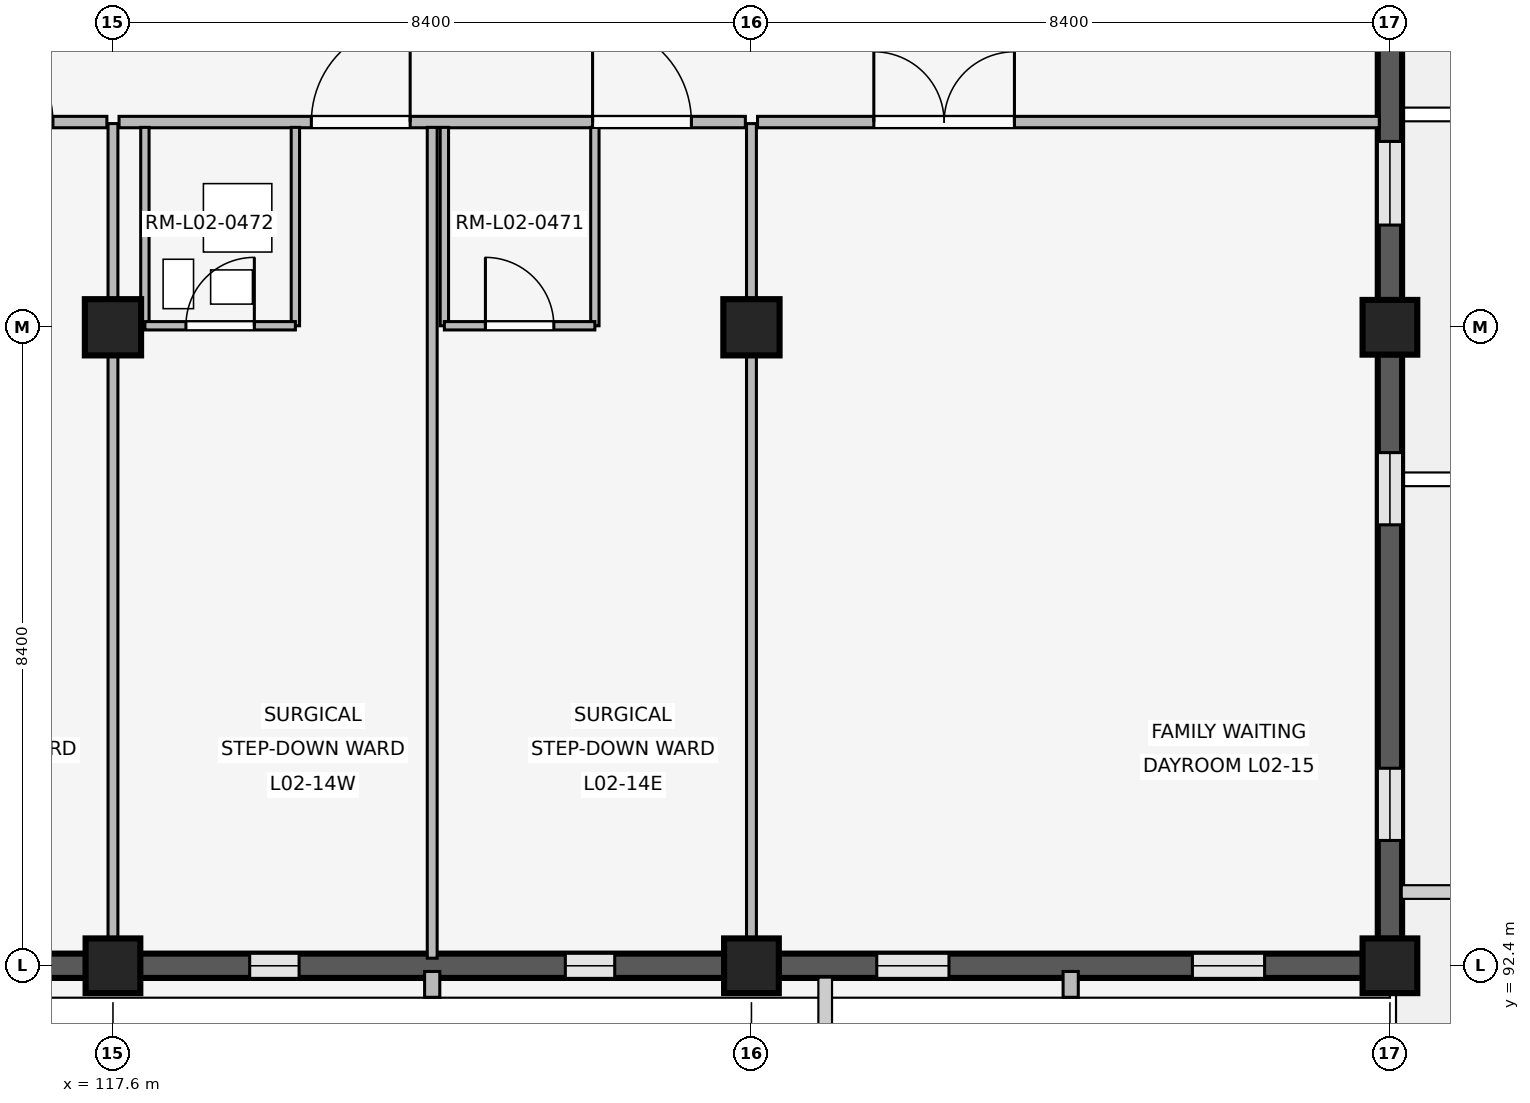
"""IFC4 building model, lengths in metres.
Left out: names, types, materials, properties, quantities, classifications, styles, units other than length and angle.
Written with IfcOpenShell. Run it as: python <this file> out.ifc"""

import sys

from ifc_helpers import new_model, si_unit, direction, frame, frame_2d, origin, origin_2d, place, context, subcontext, project, spatial, rectangle, extrude, element, fill, save


model = new_model("IFC4")
c1 = context("Model", 3, precision=1e-05, world=origin(), true_north=direction((0.0, 1.0)))
c2 = subcontext(c1, "Body", "Model", "MODEL_VIEW")
j1 = project(units=[si_unit("LENGTHUNIT", "METRE"), si_unit("PLANEANGLEUNIT", "RADIAN")], contexts=[c1])
p1 = place(None, origin())
s1 = spatial("IfcSite", under=j1, at=p1, CompositionType="ELEMENT")
p2 = place(p1, origin())
s2 = spatial("IfcBuilding", under=s1, at=p2, CompositionType="ELEMENT")
p3 = place(p2, frame((0.0, 0.0, 8.1)))
s3 = spatial("IfcBuildingStorey", under=s2, at=p3, CompositionType="ELEMENT", Elevation=8.1)
p4 = place(p3, frame((117.6, 92.4, 0.0), z_axis=(0.0, 0.0, 1.0), x_axis=(1.0, 0.0, 0.0)))
e1 = element("IfcColumn", 1, at=p4, inside=s3, PredefinedType="COLUMN", context=c2, shape_type="SweptSolid", body=[
    extrude(rectangle(XDim=0.72, YDim=0.72, at=origin_2d()), origin(), (0.0, 0.0, 1.0), 4.8),
])
p5 = place(p3, frame((117.6, 100.8, 0.0), z_axis=(0.0, 0.0, 1.0), x_axis=(1.0, 0.0, 0.0)))
e2 = element("IfcColumn", 2, at=p5, inside=s3, PredefinedType="COLUMN", context=c2, shape_type="SweptSolid", body=[
    extrude(rectangle(XDim=0.74, YDim=0.74, at=origin_2d()), origin(), (0.0, 0.0, 1.0), 4.8),
])
p6 = place(p3, frame((126.0, 92.4, 0.0), z_axis=(0.0, 0.0, 1.0), x_axis=(1.0, 0.0, 0.0)))
e3 = element("IfcColumn", 3, at=p6, inside=s3, PredefinedType="COLUMN", context=c2, shape_type="SweptSolid", body=[
    extrude(rectangle(XDim=0.72, YDim=0.72, at=origin_2d()), origin(), (0.0, 0.0, 1.0), 4.8),
])
p7 = place(p3, frame((126.0, 100.8, 0.0), z_axis=(0.0, 0.0, 1.0), x_axis=(1.0, 0.0, 0.0)))
e4 = element("IfcColumn", 4, at=p7, inside=s3, PredefinedType="COLUMN", context=c2, shape_type="SweptSolid", body=[
    extrude(rectangle(XDim=0.74, YDim=0.74, at=origin_2d()), origin(), (0.0, 0.0, 1.0), 4.8),
])
for number, where, z_axis, x_axis in (
    (5, (134.4, 92.4, 0.0), (0.0, 0.0, 1.0), (1.0, 0.0, 0.0)),
    (6, (134.4, 100.8, 0.0), (0.0, 0.0, 1.0), (1.0, 0.0, 0.0)),
):
    element("IfcColumn", number, at=place(p3, frame(where, z_axis=z_axis, x_axis=x_axis)), inside=s3, PredefinedType="COLUMN", context=c2, shape_type="SweptSolid", body=[
        extrude(rectangle(XDim=0.72, YDim=0.72, at=origin_2d()), origin(), (0.0, 0.0, 1.0), 4.8),
    ])
p8 = place(p3, frame((117.245, 92.4, 0.0), z_axis=(0.0, 0.0, 1.0), x_axis=(-1.0, 0.0, 0.0)))
e7 = element("IfcWall", 7, at=p8, inside=s3, PredefinedType="SOLIDWALL", context=c2, shape_type="SweptSolid", body=[
    extrude(rectangle(XDim=7.69, YDim=0.32, at=frame_2d((3.845, 0.0))), origin(), (0.0, 0.0, 1.0), 3.86),
])
p9 = place(p8, frame((1.394, 0.0, 0.85)))
e8 = element("IfcOpeningElement", 8, at=p9, cuts=e7, PredefinedType="OPENING", context=c2, shape_type="SweptSolid", body=[
    extrude(rectangle(XDim=0.75, YDim=1.85, at=frame_2d((0.375, 0.925))), frame((0.0, 0.17, 0.0), z_axis=(0.0, -1.0, 0.0), x_axis=(1.0, 0.0, 0.0)), (0.0, 0.0, 1.0), 0.34),
])
p10 = place(p8, frame((5.546, 0.0, 0.85)))
e9 = element("IfcOpeningElement", 9, at=p10, cuts=e7, PredefinedType="OPENING", context=c2, shape_type="SweptSolid", body=[
    extrude(rectangle(XDim=0.75, YDim=1.85, at=frame_2d((0.375, 0.925))), frame((0.0, 0.17, 0.0), z_axis=(0.0, -1.0, 0.0), x_axis=(1.0, 0.0, 0.0)), (0.0, 0.0, 1.0), 0.34),
])
p11 = place(p3, frame((125.645, 92.4, 0.0), z_axis=(0.0, 0.0, 1.0), x_axis=(-1.0, 0.0, 0.0)))
e10 = element("IfcWall", 10, at=p11, inside=s3, PredefinedType="SOLIDWALL", context=c2, shape_type="SweptSolid", body=[
    extrude(rectangle(XDim=7.69, YDim=0.32, at=frame_2d((3.845, 0.0))), origin(), (0.0, 0.0, 1.0), 3.86),
])
p12 = place(p11, frame((1.444, 0.0, 0.85)))
e11 = element("IfcOpeningElement", 11, at=p12, cuts=e10, PredefinedType="OPENING", context=c2, shape_type="SweptSolid", body=[
    extrude(rectangle(XDim=0.65, YDim=1.75, at=frame_2d((0.325, 0.875))), frame((0.0, 0.17, 0.0), z_axis=(0.0, -1.0, 0.0), x_axis=(1.0, 0.0, 0.0)), (0.0, 0.0, 1.0), 0.34),
])
p13 = place(p11, frame((5.596, 0.0, 0.85)))
e12 = element("IfcOpeningElement", 12, at=p13, cuts=e10, PredefinedType="OPENING", context=c2, shape_type="SweptSolid", body=[
    extrude(rectangle(XDim=0.65, YDim=1.75, at=frame_2d((0.325, 0.875))), frame((0.0, 0.17, 0.0), z_axis=(0.0, -1.0, 0.0), x_axis=(1.0, 0.0, 0.0)), (0.0, 0.0, 1.0), 0.34),
])
p14 = place(p3, frame((121.8, 92.325, 0.0), z_axis=(0.0, 0.0, 1.0), x_axis=(0.0, -1.0, 0.0)))
e13 = element("IfcWall", 13, at=p14, inside=s3, PredefinedType="ELEMENTEDWALL", context=c2, shape_type="SweptSolid", body=[
    extrude(rectangle(XDim=0.34, YDim=0.2, at=frame_2d((0.17, 0.0))), origin(), (0.0, 0.0, 1.0), 3.84),
])
p15 = place(p3, frame((134.045, 92.4, 0.0), z_axis=(0.0, 0.0, 1.0), x_axis=(-1.0, 0.0, 0.0)))
e14 = element("IfcWall", 14, at=p15, inside=s3, PredefinedType="SOLIDWALL", context=c2, shape_type="SweptSolid", body=[
    extrude(rectangle(XDim=7.69, YDim=0.32, at=frame_2d((3.845, 0.0))), origin(), (0.0, 0.0, 1.0), 3.86),
])
p16 = place(p15, frame((1.294, 0.0, 0.85)))
e15 = element("IfcOpeningElement", 15, at=p16, cuts=e14, PredefinedType="OPENING", context=c2, shape_type="SweptSolid", body=[
    extrude(rectangle(XDim=0.95, YDim=1.6, at=frame_2d((0.475, 0.8))), frame((0.0, 0.17, 0.0), z_axis=(0.0, -1.0, 0.0), x_axis=(1.0, 0.0, 0.0)), (0.0, 0.0, 1.0), 0.34),
])
p17 = place(p15, frame((5.446, 0.0, 0.85)))
e16 = element("IfcOpeningElement", 16, at=p17, cuts=e14, PredefinedType="OPENING", context=c2, shape_type="SweptSolid", body=[
    extrude(rectangle(XDim=0.95, YDim=1.6, at=frame_2d((0.475, 0.8))), frame((0.0, 0.17, 0.0), z_axis=(0.0, -1.0, 0.0), x_axis=(1.0, 0.0, 0.0)), (0.0, 0.0, 1.0), 0.34),
])
p18 = place(p3, frame((130.2, 92.325, 0.0), z_axis=(0.0, 0.0, 1.0), x_axis=(0.0, -1.0, 0.0)))
e17 = element("IfcWall", 17, at=p18, inside=s3, PredefinedType="ELEMENTEDWALL", context=c2, shape_type="SweptSolid", body=[
    extrude(rectangle(XDim=0.34, YDim=0.2, at=frame_2d((0.17, 0.0))), origin(), (0.0, 0.0, 1.0), 3.84),
])
p19 = place(p3, frame((134.4, 100.445, 0.0), z_axis=(0.0, 0.0, 1.0), x_axis=(0.0, -1.0, 0.0)))
e18 = element("IfcWall", 18, at=p19, inside=s3, PredefinedType="SOLIDWALL", context=c2, shape_type="SweptSolid", body=[
    extrude(rectangle(XDim=7.69, YDim=0.32, at=frame_2d((3.845, 0.0))), origin(), (0.0, 0.0, 1.0), 3.86),
])
p20 = place(p19, frame((1.294, 0.0, 0.85)))
e19 = element("IfcOpeningElement", 19, at=p20, cuts=e18, PredefinedType="OPENING", context=c2, shape_type="SweptSolid", body=[
    extrude(rectangle(XDim=0.95, YDim=1.6, at=frame_2d((0.475, 0.8))), frame((0.0, 0.17, 0.0), z_axis=(0.0, -1.0, 0.0), x_axis=(1.0, 0.0, 0.0)), (0.0, 0.0, 1.0), 0.34),
])
p21 = place(p19, frame((5.446, 0.0, 0.85)))
e20 = element("IfcOpeningElement", 20, at=p21, cuts=e18, PredefinedType="OPENING", context=c2, shape_type="SweptSolid", body=[
    extrude(rectangle(XDim=0.95, YDim=1.6, at=frame_2d((0.475, 0.8))), frame((0.0, 0.17, 0.0), z_axis=(0.0, -1.0, 0.0), x_axis=(1.0, 0.0, 0.0)), (0.0, 0.0, 1.0), 0.34),
])
p22 = place(p3, frame((134.4, 108.845, 0.0), z_axis=(0.0, 0.0, 1.0), x_axis=(0.0, -1.0, 0.0)))
e21 = element("IfcWall", 21, at=p22, inside=s3, PredefinedType="SOLIDWALL", context=c2, shape_type="SweptSolid", body=[
    extrude(rectangle(XDim=7.69, YDim=0.32, at=frame_2d((3.845, 0.0))), origin(), (0.0, 0.0, 1.0), 3.86),
])
p23 = place(p22, frame((0.99, 0.0, 0.85)))
e22 = element("IfcOpeningElement", 22, at=p23, cuts=e21, PredefinedType="OPENING", context=c2, shape_type="SweptSolid", body=[
    extrude(rectangle(XDim=1.1, YDim=1.6, at=frame_2d((0.55, 0.8))), frame((0.0, 0.17, 0.0), z_axis=(0.0, -1.0, 0.0), x_axis=(1.0, 0.0, 0.0)), (0.0, 0.0, 1.0), 0.34),
])
p24 = place(p22, frame((5.6, 0.0, 0.85)))
e23 = element("IfcOpeningElement", 23, at=p24, cuts=e21, PredefinedType="OPENING", context=c2, shape_type="SweptSolid", body=[
    extrude(rectangle(XDim=1.1, YDim=1.6, at=frame_2d((0.55, 0.8))), frame((0.0, 0.17, 0.0), z_axis=(0.0, -1.0, 0.0), x_axis=(1.0, 0.0, 0.0)), (0.0, 0.0, 1.0), 0.34),
])
p25 = place(p3, frame((109.28, 103.5, 0.0), z_axis=(0.0, 0.0, 1.0), x_axis=(1.0, 0.0, 0.0)))
e24 = element("IfcWall", 24, at=p25, inside=s3, PredefinedType="PARTITIONING", context=c2, shape_type="SweptSolid", body=[
    extrude(rectangle(XDim=8.24, YDim=0.15, at=frame_2d((4.12, 0.0))), origin(), (0.0, 0.0, 1.0), 3.84),
])
p26 = place(p25, frame((2.53, 0.0, 0.0)))
e25 = element("IfcOpeningElement", 25, at=p26, cuts=e24, PredefinedType="OPENING", context=c2, shape_type="SweptSolid", body=[
    extrude(rectangle(XDim=1.3, YDim=2.25, at=frame_2d((0.65, 1.125))), frame((0.0, 0.085, 0.0), z_axis=(0.0, -1.0, 0.0), x_axis=(1.0, 0.0, 0.0)), (0.0, 0.0, 1.0), 0.17),
])
p27 = place(p25, frame((6.23, 0.0, 0.0)))
e26 = element("IfcOpeningElement", 26, at=p27, cuts=e24, PredefinedType="OPENING", context=c2, shape_type="SweptSolid", body=[
    extrude(rectangle(XDim=1.3, YDim=2.25, at=frame_2d((0.65, 1.125))), frame((0.0, 0.085, 0.0), z_axis=(0.0, -1.0, 0.0), x_axis=(1.0, 0.0, 0.0)), (0.0, 0.0, 1.0), 0.17),
])
p28 = place(p3, frame((117.6, 92.54, 0.0), z_axis=(0.0, 0.0, 1.0), x_axis=(0.0, 1.0, 0.0)))
e27 = element("IfcWall", 27, at=p28, inside=s3, PredefinedType="PARTITIONING", context=c2, shape_type="SweptSolid", body=[
    extrude(rectangle(XDim=10.94, YDim=0.13, at=frame_2d((5.47, 0.0))), origin(), (0.0, 0.0, 1.0), 3.84),
])
p29 = place(p3, frame((117.68, 103.5, 0.0), z_axis=(0.0, 0.0, 1.0), x_axis=(1.0, 0.0, 0.0)))
e28 = element("IfcWall", 28, at=p29, inside=s3, PredefinedType="PARTITIONING", context=c2, shape_type="SweptSolid", body=[
    extrude(rectangle(XDim=8.24, YDim=0.15, at=frame_2d((4.12, 0.0))), origin(), (0.0, 0.0, 1.0), 3.84),
])
p30 = place(p29, frame((2.53, 0.0, 0.0)))
e29 = element("IfcOpeningElement", 29, at=p30, cuts=e28, PredefinedType="OPENING", context=c2, shape_type="SweptSolid", body=[
    extrude(rectangle(XDim=1.3, YDim=2.25, at=frame_2d((0.65, 1.125))), frame((0.0, 0.085, 0.0), z_axis=(0.0, -1.0, 0.0), x_axis=(1.0, 0.0, 0.0)), (0.0, 0.0, 1.0), 0.17),
])
p31 = place(p29, frame((6.23, 0.0, 0.0)))
e30 = element("IfcOpeningElement", 30, at=p31, cuts=e28, PredefinedType="OPENING", context=c2, shape_type="SweptSolid", body=[
    extrude(rectangle(XDim=1.3, YDim=2.25, at=frame_2d((0.65, 1.125))), frame((0.0, 0.085, 0.0), z_axis=(0.0, -1.0, 0.0), x_axis=(1.0, 0.0, 0.0)), (0.0, 0.0, 1.0), 0.17),
])
p32 = place(p3, frame((121.8, 92.5, 0.0), z_axis=(0.0, 0.0, 1.0), x_axis=(0.0, 1.0, 0.0)))
e31 = element("IfcWall", 31, at=p32, inside=s3, PredefinedType="PARTITIONING", context=c2, shape_type="SweptSolid", body=[
    extrude(rectangle(XDim=10.93, YDim=0.13, at=frame_2d((5.465, 0.0))), origin(), (0.0, 0.0, 1.0), 3.84),
])
for number, where, z_axis, x_axis in (
    (32, (118.02, 100.82, 0.0), (0.0, 0.0, 1.0), (0.0, 1.0, 0.0)),
    (33, (120.0, 100.82, 0.0), (0.0, 0.0, 1.0), (0.0, 1.0, 0.0)),
):
    element("IfcWall", number, at=place(p3, frame(where, z_axis=z_axis, x_axis=x_axis)), inside=s3, PredefinedType="PARTITIONING", context=c2, shape_type="SweptSolid", body=[
        extrude(rectangle(XDim=2.61, YDim=0.11, at=frame_2d((1.305, 0.0))), origin(), (0.0, 0.0, 1.0), 3.84),
    ])
p33 = place(p3, frame((118.02, 100.82, 0.0), z_axis=(0.0, 0.0, 1.0), x_axis=(1.0, 0.0, 0.0)))
e34 = element("IfcWall", 34, at=p33, inside=s3, PredefinedType="PARTITIONING", context=c2, shape_type="SweptSolid", body=[
    extrude(rectangle(XDim=1.98, YDim=0.11, at=frame_2d((0.99, 0.0))), origin(), (0.0, 0.0, 1.0), 3.84),
])
p34 = place(p33, frame((0.54, 0.0, 0.0)))
e35 = element("IfcOpeningElement", 35, at=p34, cuts=e34, PredefinedType="OPENING", context=c2, shape_type="SweptSolid", body=[
    extrude(rectangle(XDim=0.9, YDim=2.1, at=frame_2d((0.45, 1.05))), frame((0.0, 0.065, 0.0), z_axis=(0.0, -1.0, 0.0), x_axis=(1.0, 0.0, 0.0)), (0.0, 0.0, 1.0), 0.13),
])
for number, where, z_axis, x_axis in (
    (36, (121.96, 100.82, 0.0), (0.0, 0.0, 1.0), (0.0, 1.0, 0.0)),
    (37, (123.94, 100.82, 0.0), (0.0, 0.0, 1.0), (0.0, 1.0, 0.0)),
):
    element("IfcWall", number, at=place(p3, frame(where, z_axis=z_axis, x_axis=x_axis)), inside=s3, PredefinedType="PARTITIONING", context=c2, shape_type="SweptSolid", body=[
        extrude(rectangle(XDim=2.61, YDim=0.11, at=frame_2d((1.305, 0.0))), origin(), (0.0, 0.0, 1.0), 3.84),
    ])
p35 = place(p3, frame((121.96, 100.82, 0.0), z_axis=(0.0, 0.0, 1.0), x_axis=(1.0, 0.0, 0.0)))
e38 = element("IfcWall", 38, at=p35, inside=s3, PredefinedType="PARTITIONING", context=c2, shape_type="SweptSolid", body=[
    extrude(rectangle(XDim=1.98, YDim=0.11, at=frame_2d((0.99, 0.0))), origin(), (0.0, 0.0, 1.0), 3.84),
])
p36 = place(p35, frame((0.54, 0.0, 0.0)))
e39 = element("IfcOpeningElement", 39, at=p36, cuts=e38, PredefinedType="OPENING", context=c2, shape_type="SweptSolid", body=[
    extrude(rectangle(XDim=0.9, YDim=2.1, at=frame_2d((0.45, 1.05))), frame((0.0, 0.065, 0.0), z_axis=(0.0, -1.0, 0.0), x_axis=(1.0, 0.0, 0.0)), (0.0, 0.0, 1.0), 0.13),
])
p37 = place(p3, frame((126.0, 92.54, 0.0), z_axis=(0.0, 0.0, 1.0), x_axis=(0.0, 1.0, 0.0)))
e40 = element("IfcWall", 40, at=p37, inside=s3, PredefinedType="PARTITIONING", context=c2, shape_type="SweptSolid", body=[
    extrude(rectangle(XDim=10.94, YDim=0.13, at=frame_2d((5.47, 0.0))), origin(), (0.0, 0.0, 1.0), 3.84),
])
p38 = place(p3, frame((126.08, 103.5, 0.0), z_axis=(0.0, 0.0, 1.0), x_axis=(1.0, 0.0, 0.0)))
e41 = element("IfcWall", 41, at=p38, inside=s3, PredefinedType="PARTITIONING", context=c2, shape_type="SweptSolid", body=[
    extrude(rectangle(XDim=8.18, YDim=0.15, at=frame_2d((4.09, 0.0))), origin(), (0.0, 0.0, 1.0), 3.84),
])
p39 = place(p38, frame((1.53, 0.0, 0.0)))
e42 = element("IfcOpeningElement", 42, at=p39, cuts=e41, PredefinedType="OPENING", context=c2, shape_type="SweptSolid", body=[
    extrude(rectangle(XDim=1.85, YDim=2.3, at=frame_2d((0.925, 1.15))), frame((0.0, 0.085, 0.0), z_axis=(0.0, -1.0, 0.0), x_axis=(1.0, 0.0, 0.0)), (0.0, 0.0, 1.0), 0.17),
])
p40 = place(p12, origin())
e43 = element("IfcWindow", 43, at=p40, inside=s3, PartitioningType="SINGLE_PANEL", PredefinedType="WINDOW", context=c2, shape_type="SweptSolid", body=[
    extrude(rectangle(XDim=0.65, YDim=1.75, at=frame_2d((0.325, 0.875))), frame((0.0, 0.03, 0.0), z_axis=(0.0, -1.0, 0.0), x_axis=(1.0, 0.0, 0.0)), (0.0, 0.0, 1.0), 0.06),
])
fill(e11, e43)
p41 = place(p13, origin())
e44 = element("IfcWindow", 44, at=p41, inside=s3, PartitioningType="SINGLE_PANEL", PredefinedType="WINDOW", context=c2, shape_type="SweptSolid", body=[
    extrude(rectangle(XDim=0.65, YDim=1.75, at=frame_2d((0.325, 0.875))), frame((0.0, 0.03, 0.0), z_axis=(0.0, -1.0, 0.0), x_axis=(1.0, 0.0, 0.0)), (0.0, 0.0, 1.0), 0.06),
])
fill(e12, e44)
p42 = place(p16, origin())
e45 = element("IfcWindow", 45, at=p42, inside=s3, PartitioningType="SINGLE_PANEL", PredefinedType="WINDOW", context=c2, shape_type="SweptSolid", body=[
    extrude(rectangle(XDim=0.95, YDim=1.6, at=frame_2d((0.475, 0.8))), frame((0.0, 0.03, 0.0), z_axis=(0.0, -1.0, 0.0), x_axis=(1.0, 0.0, 0.0)), (0.0, 0.0, 1.0), 0.06),
])
fill(e15, e45)
p43 = place(p17, origin())
e46 = element("IfcWindow", 46, at=p43, inside=s3, PartitioningType="SINGLE_PANEL", PredefinedType="WINDOW", context=c2, shape_type="SweptSolid", body=[
    extrude(rectangle(XDim=0.95, YDim=1.6, at=frame_2d((0.475, 0.8))), frame((0.0, 0.03, 0.0), z_axis=(0.0, -1.0, 0.0), x_axis=(1.0, 0.0, 0.0)), (0.0, 0.0, 1.0), 0.06),
])
fill(e16, e46)
p44 = place(p20, origin())
e47 = element("IfcWindow", 47, at=p44, inside=s3, PartitioningType="SINGLE_PANEL", PredefinedType="WINDOW", context=c2, shape_type="SweptSolid", body=[
    extrude(rectangle(XDim=0.95, YDim=1.6, at=frame_2d((0.475, 0.8))), frame((0.0, 0.03, 0.0), z_axis=(0.0, -1.0, 0.0), x_axis=(1.0, 0.0, 0.0)), (0.0, 0.0, 1.0), 0.06),
])
fill(e19, e47)
p45 = place(p21, origin())
e48 = element("IfcWindow", 48, at=p45, inside=s3, PartitioningType="SINGLE_PANEL", PredefinedType="WINDOW", context=c2, shape_type="SweptSolid", body=[
    extrude(rectangle(XDim=0.95, YDim=1.6, at=frame_2d((0.475, 0.8))), frame((0.0, 0.03, 0.0), z_axis=(0.0, -1.0, 0.0), x_axis=(1.0, 0.0, 0.0)), (0.0, 0.0, 1.0), 0.06),
])
fill(e20, e48)
p46 = place(p24, origin())
e49 = element("IfcWindow", 49, at=p46, inside=s3, PartitioningType="SINGLE_PANEL", PredefinedType="WINDOW", context=c2, shape_type="SweptSolid", body=[
    extrude(rectangle(XDim=1.1, YDim=1.6, at=frame_2d((0.55, 0.8))), frame((0.0, 0.03, 0.0), z_axis=(0.0, -1.0, 0.0), x_axis=(1.0, 0.0, 0.0)), (0.0, 0.0, 1.0), 0.06),
])
fill(e23, e49)
p47 = place(p27, origin())
e50 = element("IfcDoor", 50, at=p47, inside=s3, OperationType="SINGLE_SWING_LEFT", PredefinedType="DOOR", context=c2, shape_type="SweptSolid", body=[
    extrude(rectangle(XDim=1.3, YDim=2.25, at=frame_2d((0.65, 1.125))), frame((0.0, 0.025, 0.0), z_axis=(0.0, -1.0, 0.0), x_axis=(1.0, 0.0, 0.0)), (0.0, 0.0, 1.0), 0.05),
])
fill(e26, e50)
p48 = place(p30, origin())
e51 = element("IfcDoor", 51, at=p48, inside=s3, OperationType="SINGLE_SWING_RIGHT", PredefinedType="DOOR", context=c2, shape_type="SweptSolid", body=[
    extrude(rectangle(XDim=1.3, YDim=2.25, at=frame_2d((0.65, 1.125))), frame((0.0, 0.025, 0.0), z_axis=(0.0, -1.0, 0.0), x_axis=(1.0, 0.0, 0.0)), (0.0, 0.0, 1.0), 0.05),
])
fill(e29, e51)
p49 = place(p31, origin())
e52 = element("IfcDoor", 52, at=p49, inside=s3, OperationType="SINGLE_SWING_LEFT", PredefinedType="DOOR", context=c2, shape_type="SweptSolid", body=[
    extrude(rectangle(XDim=1.3, YDim=2.25, at=frame_2d((0.65, 1.125))), frame((0.0, 0.025, 0.0), z_axis=(0.0, -1.0, 0.0), x_axis=(1.0, 0.0, 0.0)), (0.0, 0.0, 1.0), 0.05),
])
fill(e30, e52)
p50 = place(p34, origin())
e53 = element("IfcDoor", 53, at=p50, inside=s3, OperationType="SINGLE_SWING_RIGHT", PredefinedType="DOOR", context=c2, shape_type="SweptSolid", body=[
    extrude(rectangle(XDim=0.9, YDim=2.1, at=frame_2d((0.45, 1.05))), frame((0.0, 0.025, 0.0), z_axis=(0.0, -1.0, 0.0), x_axis=(1.0, 0.0, 0.0)), (0.0, 0.0, 1.0), 0.05),
])
fill(e35, e53)
p51 = place(p36, origin())
e54 = element("IfcDoor", 54, at=p51, inside=s3, OperationType="SINGLE_SWING_LEFT", PredefinedType="DOOR", context=c2, shape_type="SweptSolid", body=[
    extrude(rectangle(XDim=0.9, YDim=2.1, at=frame_2d((0.45, 1.05))), frame((0.0, 0.025, 0.0), z_axis=(0.0, -1.0, 0.0), x_axis=(1.0, 0.0, 0.0)), (0.0, 0.0, 1.0), 0.05),
])
fill(e39, e54)
p52 = place(p39, origin())
e55 = element("IfcDoor", 55, at=p52, inside=s3, OperationType="DOUBLE_SWING_LEFT", PredefinedType="DOOR", context=c2, shape_type="SweptSolid", body=[
    extrude(rectangle(XDim=1.85, YDim=2.3, at=frame_2d((0.925, 1.15))), frame((0.0, 0.025, 0.0), z_axis=(0.0, -1.0, 0.0), x_axis=(1.0, 0.0, 0.0)), (0.0, 0.0, 1.0), 0.05),
])
fill(e42, e55)
save(model, sys.argv[1])
